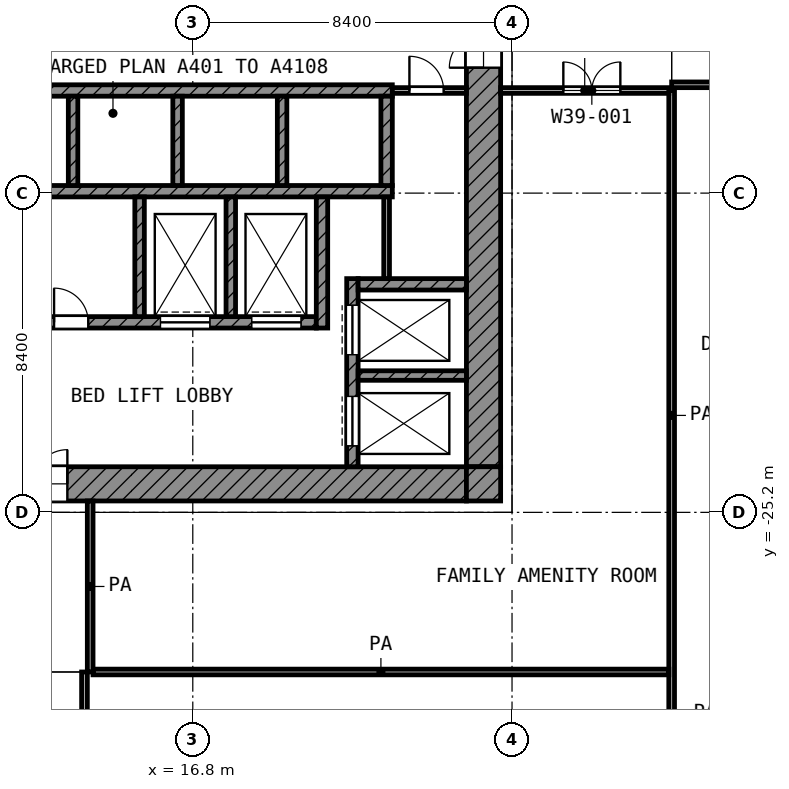
"""IFC4 building model, lengths in metres.
Left out: names, types, materials, properties, quantities, classifications, styles, units other than length and angle.
Written with IfcOpenShell. Run it as: python <this file> out.ifc"""

import sys

from ifc_helpers import new_model, si_unit, direction, frame, frame_2d, origin, place, context, subcontext, project, spatial, rectangle, extrude, element, fill, save


model = new_model("IFC4")
c1 = context("Model", 3, precision=1e-05, world=origin(), true_north=direction((0.0, 1.0)))
c2 = subcontext(c1, "Body", "Model", "MODEL_VIEW")
j1 = project(units=[si_unit("LENGTHUNIT", "METRE"), si_unit("PLANEANGLEUNIT", "RADIAN")], contexts=[c1])
p1 = place(None, origin())
s1 = spatial("IfcSite", under=j1, at=p1, CompositionType="ELEMENT")
p2 = place(p1, origin())
s2 = spatial("IfcBuilding", under=s1, at=p2, CompositionType="ELEMENT")
p3 = place(p2, frame((0.0, 0.0, 171.0)))
s3 = spatial("IfcBuildingStorey", under=s2, at=p3, CompositionType="ELEMENT", Elevation=171.0)
p4 = place(p3, frame((24.45, -24.0, 0.0), z_axis=(0.0, 0.0, 1.0), x_axis=(0.0, 1.0, 0.0)))
e1 = element("IfcWall", 1, at=p4, inside=s3, PredefinedType="SHEAR", context=c2, shape_type="SweptSolid", body=[
    extrude(rectangle(XDim=18.6, YDim=0.9, at=frame_2d((9.3, 0.0))), origin(), (0.0, 0.0, 1.0), 3.6),
])
p5 = place(p4, frame((10.5, 0.0, 0.0)))
e2 = element("IfcOpeningElement", 2, at=p5, cuts=e1, PredefinedType="OPENING", context=c2, shape_type="SweptSolid", body=[
    extrude(rectangle(XDim=1.8, YDim=2.1, at=frame_2d((0.9, 1.05))), frame((0.0, 0.46, 0.0), z_axis=(0.0, -1.0, 0.0), x_axis=(1.0, 0.0, 0.0)), (0.0, 0.0, 1.0), 0.92),
])
p6 = place(p3, frame((5.4, -24.45, 0.0), z_axis=(0.0, 0.0, 1.0), x_axis=(1.0, 0.0, 0.0)))
e3 = element("IfcWall", 3, at=p6, inside=s3, PredefinedType="SHEAR", context=c2, shape_type="SweptSolid", body=[
    extrude(rectangle(XDim=18.6, YDim=0.9, at=frame_2d((9.3, 0.0))), origin(), (0.0, 0.0, 1.0), 3.6),
])
p7 = place(p6, frame((6.3, 0.0, 0.0)))
e4 = element("IfcOpeningElement", 4, at=p7, cuts=e3, PredefinedType="OPENING", context=c2, shape_type="SweptSolid", body=[
    extrude(rectangle(XDim=1.8, YDim=2.1, at=frame_2d((0.9, 1.05))), frame((0.0, 0.46, 0.0), z_axis=(0.0, -1.0, 0.0), x_axis=(1.0, 0.0, 0.0)), (0.0, 0.0, 1.0), 0.92),
])
p8 = place(p3, frame((24.45, -24.9, 0.0), z_axis=(0.0, 0.0, 1.0), x_axis=(0.0, 1.0, 0.0)))
e5 = element("IfcWall", 5, at=p8, inside=s3, PredefinedType="SHEAR", context=c2, shape_type="SweptSolid", body=[
    extrude(rectangle(XDim=0.9, YDim=0.9, at=frame_2d((0.45, 0.0))), origin(), (0.0, 0.0, 1.0), 3.6),
])
p9 = place(p3, frame((5.4, -14.1, 0.0), z_axis=(0.0, 0.0, 1.0), x_axis=(1.0, 0.0, 0.0)))
e6 = element("IfcWall", 6, at=p9, inside=s3, PredefinedType="SHEAR", context=c2, shape_type="SweptSolid", body=[
    extrude(rectangle(XDim=16.65, YDim=0.3, at=frame_2d((8.325, 0.0))), origin(), (0.0, 0.0, 1.0), 3.6),
])
p10 = place(p9, frame((0.825, 0.0, 0.0)))
e7 = element("IfcOpeningElement", 7, at=p10, cuts=e6, PredefinedType="OPENING", context=c2, shape_type="SweptSolid", body=[
    extrude(rectangle(XDim=1.1, YDim=2.1, at=frame_2d((0.55, 1.05))), frame((0.0, 0.16, 0.0), z_axis=(0.0, -1.0, 0.0), x_axis=(1.0, 0.0, 0.0)), (0.0, 0.0, 1.0), 0.32),
])
p11 = place(p9, frame((3.575, 0.0, 0.0)))
e8 = element("IfcOpeningElement", 8, at=p11, cuts=e6, PredefinedType="OPENING", context=c2, shape_type="SweptSolid", body=[
    extrude(rectangle(XDim=1.1, YDim=2.1, at=frame_2d((0.55, 1.05))), frame((0.0, 0.16, 0.0), z_axis=(0.0, -1.0, 0.0), x_axis=(1.0, 0.0, 0.0)), (0.0, 0.0, 1.0), 0.32),
])
p12 = place(p3, frame((5.4, -16.75, 0.0), z_axis=(0.0, 0.0, 1.0), x_axis=(1.0, 0.0, 0.0)))
e9 = element("IfcWall", 9, at=p12, inside=s3, PredefinedType="SHEAR", context=c2, shape_type="SweptSolid", body=[
    extrude(rectangle(XDim=16.65, YDim=0.3, at=frame_2d((8.325, 0.0))), origin(), (0.0, 0.0, 1.0), 3.6),
])
p13 = place(p3, frame((5.4, -20.2, 0.0), z_axis=(0.0, 0.0, 1.0), x_axis=(1.0, 0.0, 0.0)))
e10 = element("IfcWall", 10, at=p13, inside=s3, PredefinedType="SHEAR", context=c2, shape_type="SweptSolid", body=[
    extrude(rectangle(XDim=14.65, YDim=0.3, at=frame_2d((7.325, 0.0))), origin(), (0.0, 0.0, 1.0), 3.6),
])
p14 = place(p13, frame((10.55, 0.0, 0.0)))
e11 = element("IfcOpeningElement", 11, at=p14, cuts=e10, PredefinedType="OPENING", context=c2, shape_type="SweptSolid", body=[
    extrude(rectangle(XDim=1.3, YDim=2.1, at=frame_2d((0.65, 1.05))), frame((0.0, 0.16, 0.0), z_axis=(0.0, -1.0, 0.0), x_axis=(1.0, 0.0, 0.0)), (0.0, 0.0, 1.0), 0.32),
])
p15 = place(p13, frame((12.95, 0.0, 0.0)))
e12 = element("IfcOpeningElement", 12, at=p15, cuts=e10, PredefinedType="OPENING", context=c2, shape_type="SweptSolid", body=[
    extrude(rectangle(XDim=1.3, YDim=2.1, at=frame_2d((0.65, 1.05))), frame((0.0, 0.16, 0.0), z_axis=(0.0, -1.0, 0.0), x_axis=(1.0, 0.0, 0.0)), (0.0, 0.0, 1.0), 0.32),
])
p16 = place(p13, frame((0.55, 0.0, 0.0)))
e13 = element("IfcOpeningElement", 13, at=p16, cuts=e10, PredefinedType="OPENING", context=c2, shape_type="SweptSolid", body=[
    extrude(rectangle(XDim=1.3, YDim=2.1, at=frame_2d((0.65, 1.05))), frame((0.0, 0.16, 0.0), z_axis=(0.0, -1.0, 0.0), x_axis=(1.0, 0.0, 0.0)), (0.0, 0.0, 1.0), 0.32),
])
p17 = place(p13, frame((2.95, 0.0, 0.0)))
e14 = element("IfcOpeningElement", 14, at=p17, cuts=e10, PredefinedType="OPENING", context=c2, shape_type="SweptSolid", body=[
    extrude(rectangle(XDim=1.3, YDim=2.1, at=frame_2d((0.65, 1.05))), frame((0.0, 0.16, 0.0), z_axis=(0.0, -1.0, 0.0), x_axis=(1.0, 0.0, 0.0)), (0.0, 0.0, 1.0), 0.32),
])
p18 = place(p13, frame((5.35, 0.0, 0.0)))
e15 = element("IfcOpeningElement", 15, at=p18, cuts=e10, PredefinedType="OPENING", context=c2, shape_type="SweptSolid", body=[
    extrude(rectangle(XDim=0.9, YDim=2.1, at=frame_2d((0.45, 1.05))), frame((0.0, 0.16, 0.0), z_axis=(0.0, -1.0, 0.0), x_axis=(1.0, 0.0, 0.0)), (0.0, 0.0, 1.0), 0.32),
])
p19 = place(p13, frame((7.75, 0.0, 0.0)))
e16 = element("IfcOpeningElement", 16, at=p19, cuts=e10, PredefinedType="OPENING", context=c2, shape_type="SweptSolid", body=[
    extrude(rectangle(XDim=0.9, YDim=2.1, at=frame_2d((0.45, 1.05))), frame((0.0, 0.16, 0.0), z_axis=(0.0, -1.0, 0.0), x_axis=(1.0, 0.0, 0.0)), (0.0, 0.0, 1.0), 0.32),
])
p20 = place(p3, frame((20.2, -20.35, 0.0), z_axis=(0.0, 0.0, 1.0), x_axis=(0.0, 1.0, 0.0)))
e17 = element("IfcWall", 17, at=p20, inside=s3, PredefinedType="SHEAR", context=c2, shape_type="SweptSolid", body=[
    extrude(rectangle(XDim=3.45, YDim=0.3, at=frame_2d((1.725, 0.0))), origin(), (0.0, 0.0, 1.0), 3.6),
])
p21 = place(p3, frame((21.9, -16.6, 0.0), z_axis=(0.0, 0.0, 1.0), x_axis=(0.0, 1.0, 0.0)))
e18 = element("IfcWall", 18, at=p21, inside=s3, PredefinedType="SHEAR", context=c2, shape_type="SweptSolid", body=[
    extrude(rectangle(XDim=2.35, YDim=0.3, at=frame_2d((1.175, 0.0))), origin(), (0.0, 0.0, 1.0), 3.6),
])
p22 = place(p3, frame((21.15, -19.2, 0.0), z_axis=(0.0, 0.0, 1.0), x_axis=(1.0, 0.0, 0.0)))
e19 = element("IfcWall", 19, at=p22, inside=s3, PredefinedType="SHEAR", context=c2, shape_type="SweptSolid", body=[
    extrude(rectangle(XDim=2.85, YDim=0.3, at=frame_2d((1.425, 0.0))), origin(), (0.0, 0.0, 1.0), 3.6),
])
p23 = place(p3, frame((21.0, -24.0, 0.0), z_axis=(0.0, 0.0, 1.0), x_axis=(0.0, 1.0, 0.0)))
e20 = element("IfcWall", 20, at=p23, inside=s3, PredefinedType="SHEAR", context=c2, shape_type="SweptSolid", body=[
    extrude(rectangle(XDim=4.95, YDim=0.3, at=frame_2d((2.475, 0.0))), origin(), (0.0, 0.0, 1.0), 3.6),
])
p24 = place(p23, frame((2.95, 0.0, 0.0)))
e21 = element("IfcOpeningElement", 21, at=p24, cuts=e20, PredefinedType="OPENING", context=c2, shape_type="SweptSolid", body=[
    extrude(rectangle(XDim=1.3, YDim=2.1, at=frame_2d((0.65, 1.05))), frame((0.0, 0.16, 0.0), z_axis=(0.0, -1.0, 0.0), x_axis=(1.0, 0.0, 0.0)), (0.0, 0.0, 1.0), 0.32),
])
p25 = place(p23, frame((0.55, 0.0, 0.0)))
e22 = element("IfcOpeningElement", 22, at=p25, cuts=e20, PredefinedType="OPENING", context=c2, shape_type="SweptSolid", body=[
    extrude(rectangle(XDim=1.3, YDim=2.1, at=frame_2d((0.65, 1.05))), frame((0.0, 0.16, 0.0), z_axis=(0.0, -1.0, 0.0), x_axis=(1.0, 0.0, 0.0)), (0.0, 0.0, 1.0), 0.32),
])
p26 = place(p3, frame((21.15, -21.6, 0.0), z_axis=(0.0, 0.0, 1.0), x_axis=(1.0, 0.0, 0.0)))
e23 = element("IfcWall", 23, at=p26, inside=s3, PredefinedType="SHEAR", context=c2, shape_type="SweptSolid", body=[
    extrude(rectangle(XDim=2.85, YDim=0.25, at=frame_2d((1.425, 0.0))), origin(), (0.0, 0.0, 1.0), 3.6),
])
for number, where, z_axis, x_axis in (
    (24, (15.4, -20.05, 0.0), (0.0, 0.0, 1.0), (0.0, 1.0, 0.0)),
    (25, (17.8, -20.05, 0.0), (0.0, 0.0, 1.0), (0.0, 1.0, 0.0)),
):
    element("IfcWall", number, at=place(p3, frame(where, z_axis=z_axis, x_axis=x_axis)), inside=s3, PredefinedType="SHEAR", context=c2, shape_type="SweptSolid", body=[
        extrude(rectangle(XDim=3.15, YDim=0.25, at=frame_2d((1.575, 0.0))), origin(), (0.0, 0.0, 1.0), 3.6),
    ])
for number, where, z_axis, x_axis in (
    (26, (13.65, -16.6, 0.0), (0.0, 0.0, 1.0), (0.0, 1.0, 0.0)),
    (27, (16.4, -16.6, 0.0), (0.0, 0.0, 1.0), (0.0, 1.0, 0.0)),
    (28, (19.15, -16.6, 0.0), (0.0, 0.0, 1.0), (0.0, 1.0, 0.0)),
):
    element("IfcWall", number, at=place(p3, frame(where, z_axis=z_axis, x_axis=x_axis)), inside=s3, PredefinedType="SHEAR", context=c2, shape_type="SweptSolid", body=[
        extrude(rectangle(XDim=2.35, YDim=0.25, at=frame_2d((1.175, 0.0))), origin(), (0.0, 0.0, 1.0), 3.6),
    ])
p27 = place(p3, frame((21.9, -19.05, 0.0), z_axis=(0.0, 0.0, 1.0), x_axis=(0.0, 1.0, 0.0)))
e29 = element("IfcWall", 29, at=p27, inside=s3, PredefinedType="PARTITIONING", context=c2, shape_type="SweptSolid", body=[
    extrude(rectangle(XDim=2.15, YDim=0.15, at=frame_2d((1.075, 0.0))), origin(), (0.0, 0.0, 1.0), 3.6),
])
p28 = place(p3, frame((22.05, -14.1, 0.0), z_axis=(0.0, 0.0, 1.0), x_axis=(1.0, 0.0, 0.0)))
e30 = element("IfcWall", 30, at=p28, inside=s3, PredefinedType="PARTITIONING", context=c2, shape_type="SweptSolid", body=[
    extrude(rectangle(XDim=1.95, YDim=0.15, at=frame_2d((0.975, 0.0))), origin(), (0.0, 0.0, 1.0), 3.6),
])
p29 = place(p28, frame((0.45, 0.0, 0.0)))
e31 = element("IfcOpeningElement", 31, at=p29, cuts=e30, PredefinedType="OPENING", context=c2, shape_type="SweptSolid", body=[
    extrude(rectangle(XDim=0.9, YDim=2.1, at=frame_2d((0.45, 1.05))), frame((0.0, 0.085, 0.0), z_axis=(0.0, -1.0, 0.0), x_axis=(1.0, 0.0, 0.0)), (0.0, 0.0, 1.0), 0.17),
])
p30 = place(p3, frame((14.175, -29.4, 0.0), z_axis=(0.0, 0.0, 1.0), x_axis=(1.0, 0.0, 0.0)))
e32 = element("IfcWall", 32, at=p30, inside=s3, PredefinedType="PARTITIONING", context=c2, shape_type="SweptSolid", body=[
    extrude(rectangle(XDim=15.15, YDim=0.15, at=frame_2d((7.575, 0.0))), origin(), (0.0, 0.0, 1.0), 3.6),
])
p31 = place(p3, frame((24.9, -14.1, 0.0), z_axis=(0.0, 0.0, 1.0), x_axis=(1.0, 0.0, 0.0)))
e33 = element("IfcWall", 33, at=p31, inside=s3, PredefinedType="PARTITIONING", context=c2, shape_type="SweptSolid", body=[
    extrude(rectangle(XDim=4.425, YDim=0.15, at=frame_2d((2.212, 0.0))), origin(), (0.0, 0.0, 1.0), 3.6),
])
p32 = place(p31, frame((1.65, 0.0, 0.0)))
e34 = element("IfcOpeningElement", 34, at=p32, cuts=e33, PredefinedType="OPENING", context=c2, shape_type="SweptSolid", body=[
    extrude(rectangle(XDim=1.5, YDim=2.1, at=frame_2d((0.75, 1.05))), frame((0.0, 0.085, 0.0), z_axis=(0.0, -1.0, 0.0), x_axis=(1.0, 0.0, 0.0)), (0.0, 0.0, 1.0), 0.17),
])
p33 = place(p3, frame((29.4, -13.95, 0.0), z_axis=(0.0, 0.0, 1.0), x_axis=(1.0, 0.0, 0.0)))
e35 = element("IfcWall", 35, at=p33, inside=s3, PredefinedType="PARTITIONING", context=c2, shape_type="SweptSolid", body=[
    extrude(rectangle(XDim=37.72, YDim=0.15, at=frame_2d((18.86, 0.0))), origin(), (0.0, 0.0, 1.0), 3.6),
])
p34 = place(p33, frame((1.6, 0.0, 0.0)))
e36 = element("IfcOpeningElement", 36, at=p34, cuts=e35, PredefinedType="OPENING", context=c2, shape_type="SweptSolid", body=[
    extrude(rectangle(XDim=1.0, YDim=2.1, at=frame_2d((0.5, 1.05))), frame((0.0, 0.085, 0.0), z_axis=(0.0, -1.0, 0.0), x_axis=(1.0, 0.0, 0.0)), (0.0, 0.0, 1.0), 0.17),
])
p35 = place(p33, frame((5.55, 0.0, 0.0)))
e37 = element("IfcOpeningElement", 37, at=p35, cuts=e35, PredefinedType="OPENING", context=c2, shape_type="SweptSolid", body=[
    extrude(rectangle(XDim=1.2, YDim=2.1, at=frame_2d((0.6, 1.05))), frame((0.0, 0.085, 0.0), z_axis=(0.0, -1.0, 0.0), x_axis=(1.0, 0.0, 0.0)), (0.0, 0.0, 1.0), 0.17),
])
p36 = place(p33, frame((11.2, 0.0, 0.0)))
e38 = element("IfcOpeningElement", 38, at=p36, cuts=e35, PredefinedType="OPENING", context=c2, shape_type="SweptSolid", body=[
    extrude(rectangle(XDim=1.2, YDim=2.1, at=frame_2d((0.6, 1.05))), frame((0.0, 0.085, 0.0), z_axis=(0.0, -1.0, 0.0), x_axis=(1.0, 0.0, 0.0)), (0.0, 0.0, 1.0), 0.17),
])
p37 = place(p33, frame((14.35, 0.0, 0.0)))
e39 = element("IfcOpeningElement", 39, at=p37, cuts=e35, PredefinedType="OPENING", context=c2, shape_type="SweptSolid", body=[
    extrude(rectangle(XDim=1.0, YDim=2.1, at=frame_2d((0.5, 1.05))), frame((0.0, 0.085, 0.0), z_axis=(0.0, -1.0, 0.0), x_axis=(1.0, 0.0, 0.0)), (0.0, 0.0, 1.0), 0.17),
])
p38 = place(p33, frame((19.6, 0.0, 0.0)))
e40 = element("IfcOpeningElement", 40, at=p38, cuts=e35, PredefinedType="OPENING", context=c2, shape_type="SweptSolid", body=[
    extrude(rectangle(XDim=1.2, YDim=2.1, at=frame_2d((0.6, 1.05))), frame((0.0, 0.085, 0.0), z_axis=(0.0, -1.0, 0.0), x_axis=(1.0, 0.0, 0.0)), (0.0, 0.0, 1.0), 0.17),
])
p39 = place(p33, frame((21.2, 0.0, 0.0)))
e41 = element("IfcOpeningElement", 41, at=p39, cuts=e35, PredefinedType="OPENING", context=c2, shape_type="SweptSolid", body=[
    extrude(rectangle(XDim=1.1, YDim=2.1, at=frame_2d((0.55, 1.05))), frame((0.0, 0.085, 0.0), z_axis=(0.0, -1.0, 0.0), x_axis=(1.0, 0.0, 0.0)), (0.0, 0.0, 1.0), 0.17),
])
p40 = place(p33, frame((27.9, 0.0, 0.0)))
e42 = element("IfcOpeningElement", 42, at=p40, cuts=e35, PredefinedType="OPENING", context=c2, shape_type="SweptSolid", body=[
    extrude(rectangle(XDim=1.2, YDim=2.1, at=frame_2d((0.6, 1.05))), frame((0.0, 0.085, 0.0), z_axis=(0.0, -1.0, 0.0), x_axis=(1.0, 0.0, 0.0)), (0.0, 0.0, 1.0), 0.17),
])
p41 = place(p33, frame((31.0, 0.0, 0.0)))
e43 = element("IfcOpeningElement", 43, at=p41, cuts=e35, PredefinedType="OPENING", context=c2, shape_type="SweptSolid", body=[
    extrude(rectangle(XDim=1.0, YDim=2.1, at=frame_2d((0.5, 1.05))), frame((0.0, 0.085, 0.0), z_axis=(0.0, -1.0, 0.0), x_axis=(1.0, 0.0, 0.0)), (0.0, 0.0, 1.0), 0.17),
])
p42 = place(p33, frame((35.2, 0.0, 0.0)))
e44 = element("IfcOpeningElement", 44, at=p42, cuts=e35, PredefinedType="OPENING", context=c2, shape_type="SweptSolid", body=[
    extrude(rectangle(XDim=1.0, YDim=2.1, at=frame_2d((0.5, 1.05))), frame((0.0, 0.085, 0.0), z_axis=(0.0, -1.0, 0.0), x_axis=(1.0, 0.0, 0.0)), (0.0, 0.0, 1.0), 0.17),
])
p43 = place(p3, frame((13.95, -54.52, 0.0), z_axis=(0.0, 0.0, 1.0), x_axis=(0.0, 1.0, 0.0)))
e45 = element("IfcWall", 45, at=p43, inside=s3, PredefinedType="PARTITIONING", context=c2, shape_type="SweptSolid", body=[
    extrude(rectangle(XDim=25.12, YDim=0.15, at=frame_2d((12.56, 0.0))), origin(), (0.0, 0.0, 1.0), 3.6),
])
p44 = place(p43, frame((22.52, 0.0, 0.0)))
e46 = element("IfcOpeningElement", 46, at=p44, cuts=e45, PredefinedType="OPENING", context=c2, shape_type="SweptSolid", body=[
    extrude(rectangle(XDim=1.0, YDim=2.1, at=frame_2d((0.5, 1.05))), frame((0.0, 0.085, 0.0), z_axis=(0.0, -1.0, 0.0), x_axis=(1.0, 0.0, 0.0)), (0.0, 0.0, 1.0), 0.17),
])
p45 = place(p43, frame((18.37, 0.0, 0.0)))
e47 = element("IfcOpeningElement", 47, at=p45, cuts=e45, PredefinedType="OPENING", context=c2, shape_type="SweptSolid", body=[
    extrude(rectangle(XDim=1.2, YDim=2.1, at=frame_2d((0.6, 1.05))), frame((0.0, 0.085, 0.0), z_axis=(0.0, -1.0, 0.0), x_axis=(1.0, 0.0, 0.0)), (0.0, 0.0, 1.0), 0.17),
])
p46 = place(p43, frame((13.52, 0.0, 0.0)))
e48 = element("IfcOpeningElement", 48, at=p46, cuts=e45, PredefinedType="OPENING", context=c2, shape_type="SweptSolid", body=[
    extrude(rectangle(XDim=1.2, YDim=2.1, at=frame_2d((0.6, 1.05))), frame((0.0, 0.085, 0.0), z_axis=(0.0, -1.0, 0.0), x_axis=(1.0, 0.0, 0.0)), (0.0, 0.0, 1.0), 0.17),
])
p47 = place(p43, frame((11.12, 0.0, 0.0)))
e49 = element("IfcOpeningElement", 49, at=p47, cuts=e45, PredefinedType="OPENING", context=c2, shape_type="SweptSolid", body=[
    extrude(rectangle(XDim=1.2, YDim=2.1, at=frame_2d((0.6, 1.05))), frame((0.0, 0.085, 0.0), z_axis=(0.0, -1.0, 0.0), x_axis=(1.0, 0.0, 0.0)), (0.0, 0.0, 1.0), 0.17),
])
p48 = place(p43, frame((3.22, 0.0, 0.0)))
e50 = element("IfcOpeningElement", 50, at=p48, cuts=e45, PredefinedType="OPENING", context=c2, shape_type="SweptSolid", body=[
    extrude(rectangle(XDim=1.5, YDim=2.1, at=frame_2d((0.75, 1.05))), frame((0.0, 0.085, 0.0), z_axis=(0.0, -1.0, 0.0), x_axis=(1.0, 0.0, 0.0)), (0.0, 0.0, 1.0), 0.17),
])
p49 = place(p3, frame((14.1, -29.4, 0.0), z_axis=(0.0, 0.0, 1.0), x_axis=(0.0, 1.0, 0.0)))
e51 = element("IfcWall", 51, at=p49, inside=s3, PredefinedType="PARTITIONING", context=c2, shape_type="SweptSolid", body=[
    extrude(rectangle(XDim=4.5, YDim=0.15, at=frame_2d((2.25, 0.0))), origin(), (0.0, 0.0, 1.0), 3.6),
])
p50 = place(p3, frame((29.4, -31.198, 0.0), z_axis=(0.0, 0.0, 1.0), x_axis=(0.0, 1.0, 0.0)))
e52 = element("IfcWall", 52, at=p50, inside=s3, PredefinedType="PARTITIONING", context=c2, shape_type="SweptSolid", body=[
    extrude(rectangle(XDim=17.098, YDim=0.15, at=frame_2d((8.549, 0.0))), origin(), (0.0, 0.0, 1.0), 3.6),
])
p51 = place(p24, origin())
e53 = element("IfcDoor", 53, at=p51, inside=s3, OperationType="DOUBLE_DOOR_SLIDING", PredefinedType="DOOR", context=c2, shape_type="SweptSolid", body=[
    extrude(rectangle(XDim=1.3, YDim=2.1, at=frame_2d((0.65, 1.05))), frame((0.0, 0.025, 0.0), z_axis=(0.0, -1.0, 0.0), x_axis=(1.0, 0.0, 0.0)), (0.0, 0.0, 1.0), 0.05),
])
fill(e21, e53)
p52 = place(p25, origin())
e54 = element("IfcDoor", 54, at=p52, inside=s3, OperationType="DOUBLE_DOOR_SLIDING", PredefinedType="DOOR", context=c2, shape_type="SweptSolid", body=[
    extrude(rectangle(XDim=1.3, YDim=2.1, at=frame_2d((0.65, 1.05))), frame((0.0, 0.025, 0.0), z_axis=(0.0, -1.0, 0.0), x_axis=(1.0, 0.0, 0.0)), (0.0, 0.0, 1.0), 0.05),
])
fill(e22, e54)
p53 = place(p14, origin())
e55 = element("IfcDoor", 55, at=p53, inside=s3, OperationType="DOUBLE_DOOR_SLIDING", PredefinedType="DOOR", context=c2, shape_type="SweptSolid", body=[
    extrude(rectangle(XDim=1.3, YDim=2.1, at=frame_2d((0.65, 1.05))), frame((0.0, 0.025, 0.0), z_axis=(0.0, -1.0, 0.0), x_axis=(1.0, 0.0, 0.0)), (0.0, 0.0, 1.0), 0.05),
])
fill(e11, e55)
p54 = place(p15, origin())
e56 = element("IfcDoor", 56, at=p54, inside=s3, OperationType="DOUBLE_DOOR_SLIDING", PredefinedType="DOOR", context=c2, shape_type="SweptSolid", body=[
    extrude(rectangle(XDim=1.3, YDim=2.1, at=frame_2d((0.65, 1.05))), frame((0.0, 0.025, 0.0), z_axis=(0.0, -1.0, 0.0), x_axis=(1.0, 0.0, 0.0)), (0.0, 0.0, 1.0), 0.05),
])
fill(e12, e56)
p55 = place(p5, origin())
e57 = element("IfcDoor", 57, at=p55, inside=s3, OperationType="DOUBLE_DOOR_SINGLE_SWING", PredefinedType="DOOR", context=c2, shape_type="SweptSolid", body=[
    extrude(rectangle(XDim=1.8, YDim=2.1, at=frame_2d((0.9, 1.05))), frame((0.0, 0.025, 0.0), z_axis=(0.0, -1.0, 0.0), x_axis=(1.0, 0.0, 0.0)), (0.0, 0.0, 1.0), 0.05),
])
fill(e2, e57)
p56 = place(p7, origin())
e58 = element("IfcDoor", 58, at=p56, inside=s3, OperationType="DOUBLE_DOOR_SINGLE_SWING", PredefinedType="DOOR", context=c2, shape_type="SweptSolid", body=[
    extrude(rectangle(XDim=1.8, YDim=2.1, at=frame_2d((0.9, 1.05))), frame((0.0, 0.025, 0.0), z_axis=(0.0, -1.0, 0.0), x_axis=(1.0, 0.0, 0.0)), (0.0, 0.0, 1.0), 0.05),
])
fill(e4, e58)
p57 = place(p29, origin())
e59 = element("IfcDoor", 59, at=p57, inside=s3, OperationType="SINGLE_SWING_LEFT", PredefinedType="DOOR", context=c2, shape_type="SweptSolid", body=[
    extrude(rectangle(XDim=0.9, YDim=2.1, at=frame_2d((0.45, 1.05))), frame((0.0, 0.025, 0.0), z_axis=(0.0, -1.0, 0.0), x_axis=(1.0, 0.0, 0.0)), (0.0, 0.0, 1.0), 0.05),
])
fill(e31, e59)
p58 = place(p19, origin())
e60 = element("IfcDoor", 60, at=p58, inside=s3, OperationType="SINGLE_SWING_LEFT", PredefinedType="DOOR", context=c2, shape_type="SweptSolid", body=[
    extrude(rectangle(XDim=0.9, YDim=2.1, at=frame_2d((0.45, 1.05))), frame((0.0, 0.025, 0.0), z_axis=(0.0, -1.0, 0.0), x_axis=(1.0, 0.0, 0.0)), (0.0, 0.0, 1.0), 0.05),
])
fill(e16, e60)
p59 = place(p32, origin())
e61 = element("IfcDoor", 61, at=p59, inside=s3, OperationType="DOUBLE_DOOR_SINGLE_SWING", PredefinedType="DOOR", context=c2, shape_type="SweptSolid", body=[
    extrude(rectangle(XDim=1.5, YDim=2.1, at=frame_2d((0.75, 1.05))), frame((0.0, 0.025, 0.0), z_axis=(0.0, -1.0, 0.0), x_axis=(1.0, 0.0, 0.0)), (0.0, 0.0, 1.0), 0.05),
])
fill(e34, e61)
save(model, sys.argv[1])
